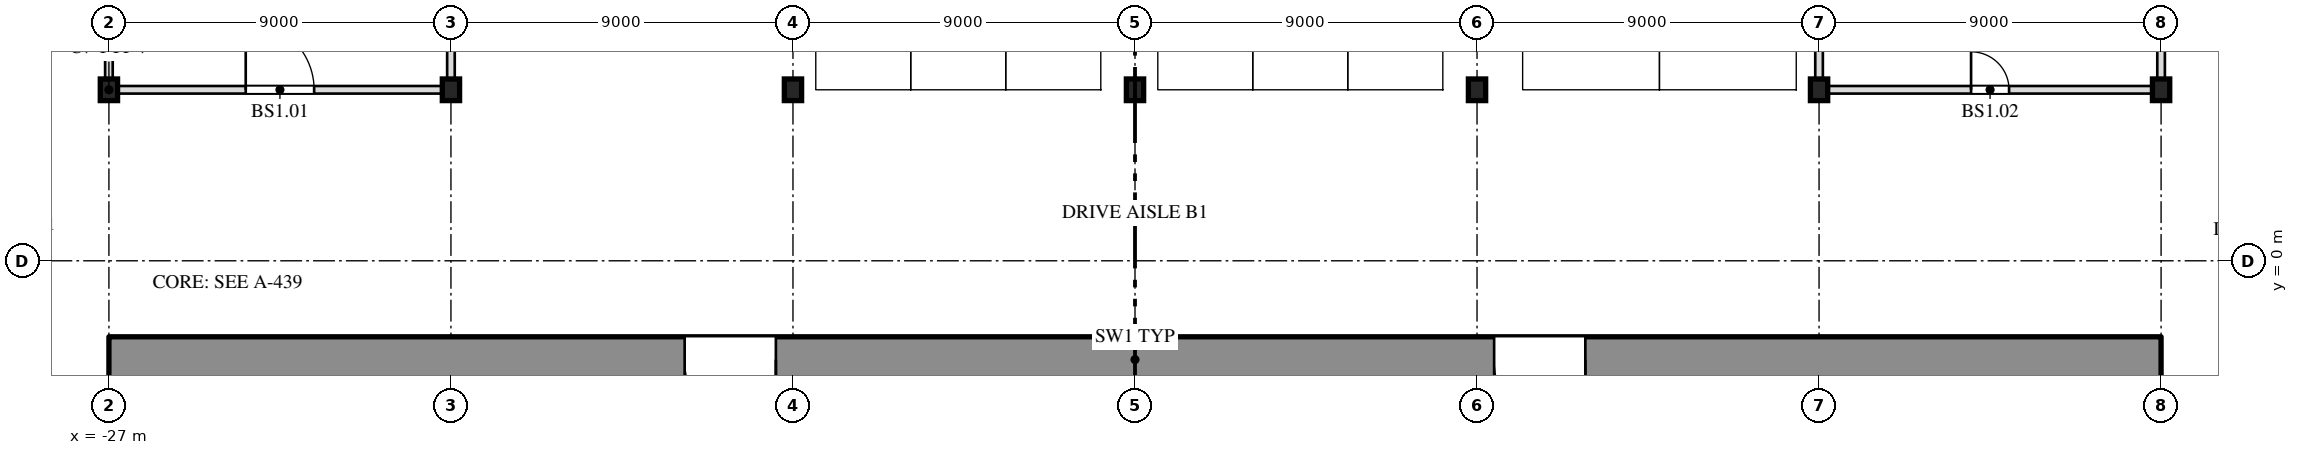
"""IFC4 building model, lengths in metres.
Left out: names, types, materials, properties, quantities, classifications, styles, units other than length and angle.
Written with IfcOpenShell. Run it as: python <this file> out.ifc"""

import sys

from ifc_helpers import new_model, si_unit, direction, frame, frame_2d, origin, origin_2d, place, context, subcontext, project, spatial, rectangle, i_section, extrude, element, fill, save


model = new_model("IFC4")
c1 = context("Model", 3, precision=1e-05, world=origin(), true_north=direction((0.0, 1.0)))
c2 = subcontext(c1, "Body", "Model", "MODEL_VIEW")
j1 = project(units=[si_unit("LENGTHUNIT", "METRE"), si_unit("PLANEANGLEUNIT", "RADIAN")], contexts=[c1])
p1 = place(None, origin())
s1 = spatial("IfcSite", under=j1, at=p1, CompositionType="ELEMENT")
p2 = place(p1, origin())
s2 = spatial("IfcBuilding", under=s1, at=p2, CompositionType="ELEMENT")
p3 = place(p2, frame((0.0, 0.0, -4.2)))
s3 = spatial("IfcBuildingStorey", under=s2, at=p3, CompositionType="ELEMENT", Elevation=-4.2)
for number, where, z_axis, x_axis in (
    (1, (-27.0, 4.5, 0.0), (0.0, 0.0, 1.0), (1.0, 0.0, 0.0)),
    (2, (-18.0, 4.5, 0.0), (0.0, 0.0, 1.0), (1.0, 0.0, 0.0)),
    (3, (-9.0, 4.5, 0.0), (0.0, 0.0, 1.0), (1.0, 0.0, 0.0)),
    (4, (0.0, 4.5, 0.0), (0.0, 0.0, 1.0), (1.0, 0.0, 0.0)),
    (5, (9.0, 4.5, 0.0), (0.0, 0.0, 1.0), (1.0, 0.0, 0.0)),
    (6, (18.0, 4.5, 0.0), (0.0, 0.0, 1.0), (1.0, 0.0, 0.0)),
    (7, (27.0, 4.5, 0.0), (0.0, 0.0, 1.0), (1.0, 0.0, 0.0)),
):
    element("IfcColumn", number, at=place(p3, frame(where, z_axis=z_axis, x_axis=x_axis)), inside=s3, PredefinedType="COLUMN", context=c2, shape_type="SweptSolid", body=[
        extrude(i_section(OverallWidth=0.455, OverallDepth=0.569, WebThickness=0.078, FlangeThickness=0.125, at=origin_2d()), origin(), (0.0, 0.0, 1.0), 4.2),
    ])
p4 = place(p3, frame((-27.0, -2.6, 0.0), z_axis=(0.0, 0.0, 1.0), x_axis=(1.0, 0.0, 0.0)))
e8 = element("IfcWall", 8, at=p4, inside=s3, PredefinedType="SHEAR", context=c2, shape_type="SweptSolid", body=[
    extrude(rectangle(XDim=54.0, YDim=1.2, at=frame_2d((27.0, 0.0))), origin(), (0.0, 0.0, 1.0), 3.9),
])
p5 = place(p4, frame((15.15, 0.0, 0.0)))
e9 = element("IfcOpeningElement", 9, at=p5, cuts=e8, PredefinedType="OPENING", context=c2, shape_type="SweptSolid", body=[
    extrude(rectangle(XDim=2.4, YDim=2.1, at=frame_2d((1.2, 1.05))), frame((0.0, 0.612, 0.0), z_axis=(0.0, -1.0, 0.0), x_axis=(1.0, 0.0, 0.0)), (0.0, 0.0, 1.0), 1.224),
])
p6 = place(p4, frame((36.45, 0.0, 0.0)))
e10 = element("IfcOpeningElement", 10, at=p6, cuts=e8, PredefinedType="OPENING", context=c2, shape_type="SweptSolid", body=[
    extrude(rectangle(XDim=2.4, YDim=2.1, at=frame_2d((1.2, 1.05))), frame((0.0, 0.612, 0.0), z_axis=(0.0, -1.0, 0.0), x_axis=(1.0, 0.0, 0.0)), (0.0, 0.0, 1.0), 1.224),
])
p7 = place(p3, frame((-26.773, 4.5, 0.0), z_axis=(0.0, 0.0, 1.0), x_axis=(1.0, 0.0, 0.0)))
e11 = element("IfcWall", 11, at=p7, inside=s3, PredefinedType="PARTITIONING", context=c2, shape_type="SweptSolid", body=[
    extrude(rectangle(XDim=8.545, YDim=0.2, at=frame_2d((4.273, 0.0))), origin(), (0.0, 0.0, 1.0), 3.288),
])
p8 = place(p7, frame((3.373, 0.0, 0.0)))
e12 = element("IfcOpeningElement", 12, at=p8, cuts=e11, PredefinedType="OPENING", context=c2, shape_type="SweptSolid", body=[
    extrude(rectangle(XDim=1.8, YDim=2.1, at=frame_2d((0.9, 1.05))), frame((0.0, 0.112, 0.0), z_axis=(0.0, -1.0, 0.0), x_axis=(1.0, 0.0, 0.0)), (0.0, 0.0, 1.0), 0.224),
])
p9 = place(p3, frame((18.227, 4.5, 0.0), z_axis=(0.0, 0.0, 1.0), x_axis=(1.0, 0.0, 0.0)))
e13 = element("IfcWall", 13, at=p9, inside=s3, PredefinedType="PARTITIONING", context=c2, shape_type="SweptSolid", body=[
    extrude(rectangle(XDim=8.545, YDim=0.2, at=frame_2d((4.273, 0.0))), origin(), (0.0, 0.0, 1.0), 3.288),
])
p10 = place(p9, frame((3.773, 0.0, 0.0)))
e14 = element("IfcOpeningElement", 14, at=p10, cuts=e13, PredefinedType="OPENING", context=c2, shape_type="SweptSolid", body=[
    extrude(rectangle(XDim=1.0, YDim=2.1, at=frame_2d((0.5, 1.05))), frame((0.0, 0.112, 0.0), z_axis=(0.0, -1.0, 0.0), x_axis=(1.0, 0.0, 0.0)), (0.0, 0.0, 1.0), 0.224),
])
for number, where, z_axis, x_axis in (
    (15, (-27.0, 4.784, 0.0), (0.0, 0.0, 1.0), (0.0, 1.0, 0.0)),
    (16, (-18.0, 4.784, 0.0), (0.0, 0.0, 1.0), (0.0, 1.0, 0.0)),
    (17, (18.0, 4.784, 0.0), (0.0, 0.0, 1.0), (0.0, 1.0, 0.0)),
    (18, (27.0, 4.784, 0.0), (0.0, 0.0, 1.0), (0.0, 1.0, 0.0)),
):
    element("IfcWall", number, at=place(p3, frame(where, z_axis=z_axis, x_axis=x_axis)), inside=s3, PredefinedType="PARTITIONING", context=c2, shape_type="SweptSolid", body=[
        extrude(rectangle(XDim=2.615, YDim=0.2, at=frame_2d((1.308, 0.0))), origin(), (0.0, 0.0, 1.0), 3.288),
    ])
p11 = place(p8, origin())
e19 = element("IfcDoor", 19, at=p11, inside=s3, OperationType="DOUBLE_DOOR_SINGLE_SWING", PredefinedType="DOOR", context=c2, shape_type="SweptSolid", body=[
    extrude(rectangle(XDim=1.8, YDim=2.1, at=frame_2d((0.9, 1.05))), frame((0.0, 0.025, 0.0), z_axis=(0.0, -1.0, 0.0), x_axis=(1.0, 0.0, 0.0)), (0.0, 0.0, 1.0), 0.05),
])
fill(e12, e19)
p12 = place(p10, origin())
e20 = element("IfcDoor", 20, at=p12, inside=s3, OperationType="SINGLE_SWING_LEFT", PredefinedType="DOOR", context=c2, shape_type="SweptSolid", body=[
    extrude(rectangle(XDim=1.0, YDim=2.1, at=frame_2d((0.5, 1.05))), frame((0.0, 0.025, 0.0), z_axis=(0.0, -1.0, 0.0), x_axis=(1.0, 0.0, 0.0)), (0.0, 0.0, 1.0), 0.05),
])
fill(e14, e20)
p13 = place(p5, origin())
e21 = element("IfcDoor", 21, at=p13, inside=s3, OperationType="DOUBLE_DOOR_SINGLE_SWING", PredefinedType="DOOR", context=c2, shape_type="SweptSolid", body=[
    extrude(rectangle(XDim=2.4, YDim=2.1, at=frame_2d((1.2, 1.05))), frame((0.0, 0.025, 0.0), z_axis=(0.0, -1.0, 0.0), x_axis=(1.0, 0.0, 0.0)), (0.0, 0.0, 1.0), 0.05),
])
fill(e9, e21)
p14 = place(p6, origin())
e22 = element("IfcDoor", 22, at=p14, inside=s3, OperationType="DOUBLE_DOOR_SINGLE_SWING", PredefinedType="DOOR", context=c2, shape_type="SweptSolid", body=[
    extrude(rectangle(XDim=2.4, YDim=2.1, at=frame_2d((1.2, 1.05))), frame((0.0, 0.025, 0.0), z_axis=(0.0, -1.0, 0.0), x_axis=(1.0, 0.0, 0.0)), (0.0, 0.0, 1.0), 0.05),
])
fill(e10, e22)
save(model, sys.argv[1])
